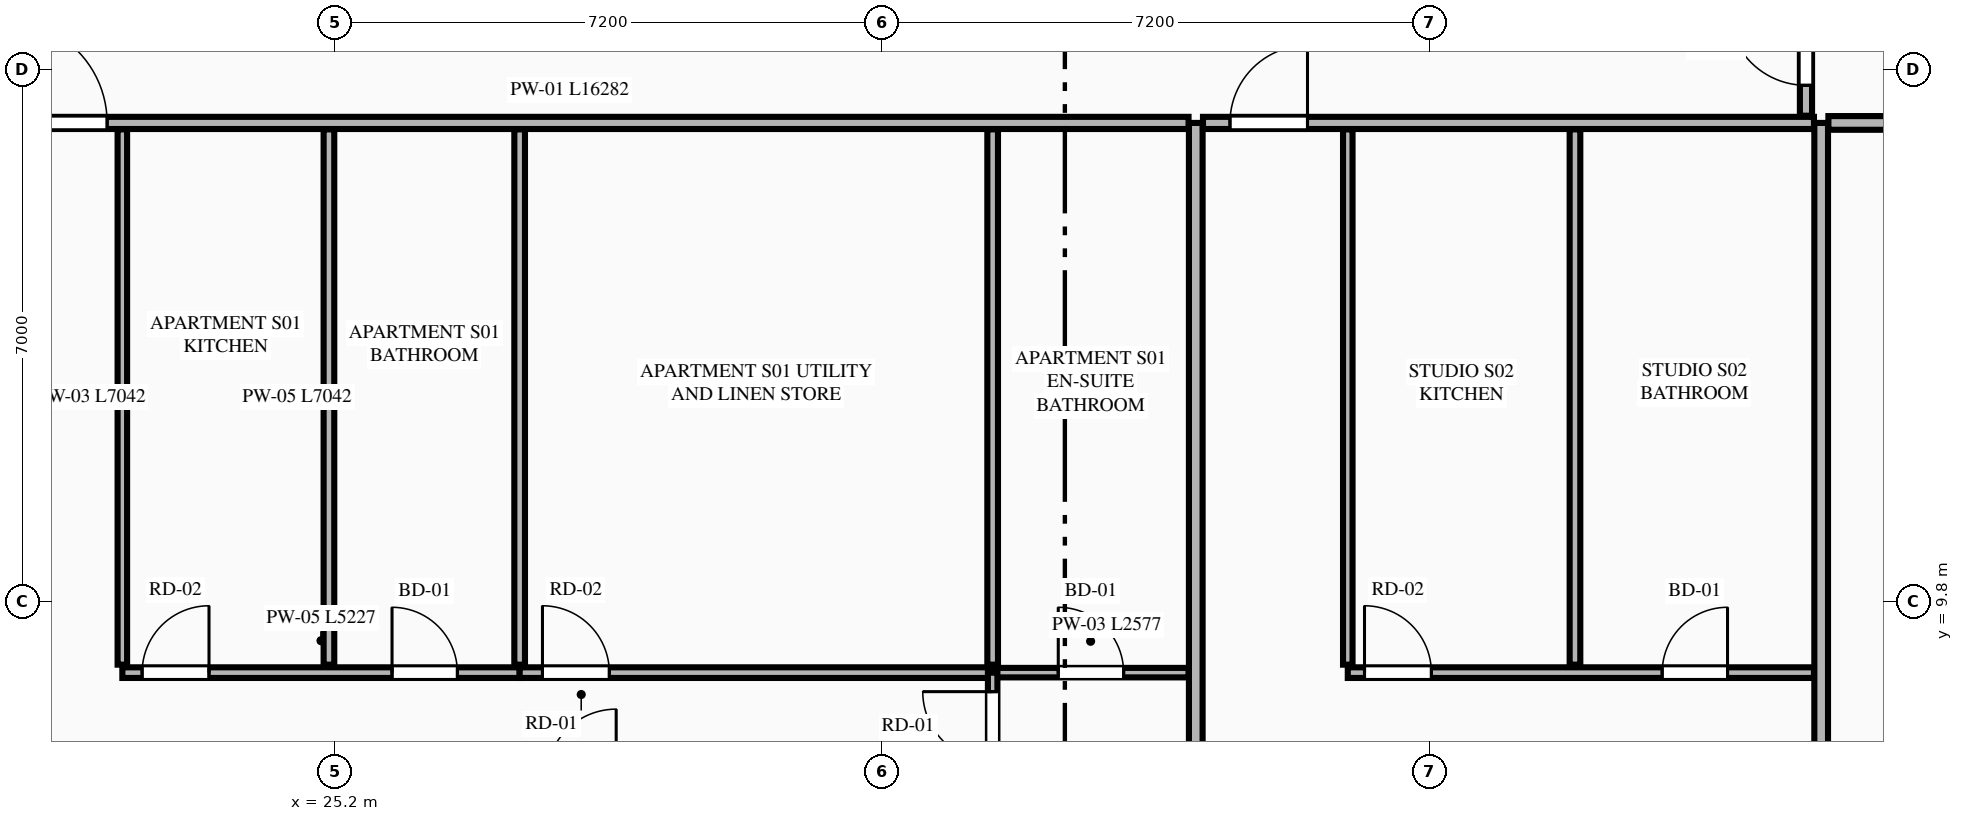
"""IFC4 building model, lengths in metres.
Left out: names, types, materials, properties, quantities, classifications, styles, units other than length and angle.
Written with IfcOpenShell. Run it as: python <this file> out.ifc"""

import sys

from ifc_helpers import new_model, si_unit, direction, frame, frame_2d, origin, place, context, subcontext, project, spatial, rectangle, extrude, element, fill, save


model = new_model("IFC4")
c1 = context("Model", 3, precision=1e-05, world=origin(), true_north=direction((0.0, 1.0)))
c2 = subcontext(c1, "Body", "Model", "MODEL_VIEW")
j1 = project(units=[si_unit("LENGTHUNIT", "METRE"), si_unit("PLANEANGLEUNIT", "RADIAN")], contexts=[c1])
p1 = place(None, origin())
s1 = spatial("IfcSite", under=j1, at=p1, CompositionType="ELEMENT")
p2 = place(p1, origin())
s2 = spatial("IfcBuilding", under=s1, at=p2, CompositionType="ELEMENT")
p3 = place(p2, frame((0.0, 0.0, 87.1)))
s3 = spatial("IfcBuildingStorey", under=s2, at=p3, CompositionType="ELEMENT", Elevation=87.1)
p4 = place(p3, frame((36.522, 2.455, 0.0), z_axis=(0.0, 0.0, 1.0), x_axis=(0.0, 1.0, 0.0)))
e1 = element("IfcWall", 1, at=p4, inside=s3, PredefinedType="PARTITIONING", context=c2, shape_type="SweptSolid", body=[
    extrude(rectangle(XDim=13.645, YDim=0.18, at=frame_2d((6.823, 0.0))), origin(), (0.0, 0.0, 1.0), 2.7),
])
p5 = place(p3, frame((44.75, 2.455, 0.0), z_axis=(0.0, 0.0, 1.0), x_axis=(0.0, 1.0, 0.0)))
e2 = element("IfcWall", 2, at=p5, inside=s3, PredefinedType="PARTITIONING", context=c2, shape_type="SweptSolid", body=[
    extrude(rectangle(XDim=13.645, YDim=0.18, at=frame_2d((6.823, 0.0))), origin(), (0.0, 0.0, 1.0), 3.33),
])
p6 = place(p3, frame((20.145, 16.1, 0.0), z_axis=(0.0, 0.0, 1.0), x_axis=(1.0, 0.0, 0.0)))
e3 = element("IfcWall", 3, at=p6, inside=s3, PredefinedType="PARTITIONING", context=c2, shape_type="SweptSolid", body=[
    extrude(rectangle(XDim=16.282, YDim=0.16, at=frame_2d((8.141, 0.0))), origin(), (0.0, 0.0, 1.0), 3.33),
])
p7 = place(p6, frame((0.705, 0.0, 0.0)))
e4 = element("IfcOpeningElement", 4, at=p7, cuts=e3, PredefinedType="OPENING", context=c2, shape_type="SweptSolid", body=[
    extrude(rectangle(XDim=1.35, YDim=2.35, at=frame_2d((0.675, 1.175))), frame((0.0, 0.09, 0.0), z_axis=(0.0, -1.0, 0.0), x_axis=(1.0, 0.0, 0.0)), (0.0, 0.0, 1.0), 0.18),
])
p8 = place(p3, frame((22.4, 8.973, 0.0), z_axis=(0.0, 0.0, 1.0), x_axis=(0.0, 1.0, 0.0)))
e5 = element("IfcWall", 5, at=p8, inside=s3, PredefinedType="PARTITIONING", context=c2, shape_type="SweptSolid", body=[
    extrude(rectangle(XDim=7.042, YDim=0.125, at=frame_2d((3.521, 0.0))), origin(), (0.0, 0.0, 1.0), 2.7),
])
p9 = place(p3, frame((22.4, 8.868, 0.0), z_axis=(0.0, 0.0, 1.0), x_axis=(1.0, 0.0, 0.0)))
e6 = element("IfcWall", 6, at=p9, inside=s3, PredefinedType="PLUMBINGWALL", context=c2, shape_type="SweptSolid", body=[
    extrude(rectangle(XDim=5.227, YDim=0.14, at=frame_2d((2.614, 0.0))), origin(), (0.0, 0.0, 1.0), 3.33),
])
p10 = place(p9, frame((3.548, 0.0, 0.0)))
e7 = element("IfcOpeningElement", 7, at=p10, cuts=e6, PredefinedType="OPENING", context=c2, shape_type="SweptSolid", body=[
    extrude(rectangle(XDim=0.86, YDim=2.1, at=frame_2d((0.43, 1.05))), frame((0.0, 0.08, 0.0), z_axis=(0.0, -1.0, 0.0), x_axis=(1.0, 0.0, 0.0)), (0.0, 0.0, 1.0), 0.16),
])
p11 = place(p9, frame((0.26, 0.0, 0.0)))
e8 = element("IfcOpeningElement", 8, at=p11, cuts=e6, PredefinedType="OPENING", context=c2, shape_type="SweptSolid", body=[
    extrude(rectangle(XDim=0.88, YDim=2.15, at=frame_2d((0.44, 1.075))), frame((0.0, 0.08, 0.0), z_axis=(0.0, -1.0, 0.0), x_axis=(1.0, 0.0, 0.0)), (0.0, 0.0, 1.0), 0.16),
])
p12 = place(p3, frame((27.627, 8.868, 0.0), z_axis=(0.0, 0.0, 1.0), x_axis=(1.0, 0.0, 0.0)))
e9 = element("IfcWall", 9, at=p12, inside=s3, PredefinedType="PLUMBINGWALL", context=c2, shape_type="SweptSolid", body=[
    extrude(rectangle(XDim=6.223, YDim=0.14, at=frame_2d((3.112, 0.0))), origin(), (0.0, 0.0, 1.0), 3.33),
])
p13 = place(p12, frame((0.3, 0.0, 0.0)))
e10 = element("IfcOpeningElement", 10, at=p13, cuts=e9, PredefinedType="OPENING", context=c2, shape_type="SweptSolid", body=[
    extrude(rectangle(XDim=0.88, YDim=2.15, at=frame_2d((0.44, 1.075))), frame((0.0, 0.08, 0.0), z_axis=(0.0, -1.0, 0.0), x_axis=(1.0, 0.0, 0.0)), (0.0, 0.0, 1.0), 0.16),
])
p14 = place(p3, frame((33.85, 8.868, 0.0), z_axis=(0.0, 0.0, 1.0), x_axis=(1.0, 0.0, 0.0)))
e11 = element("IfcWall", 11, at=p14, inside=s3, PredefinedType="PARTITIONING", context=c2, shape_type="SweptSolid", body=[
    extrude(rectangle(XDim=2.577, YDim=0.125, at=frame_2d((1.289, 0.0))), origin(), (0.0, 0.0, 1.0), 3.33),
])
p15 = place(p14, frame((0.863, 0.0, 0.0)))
e12 = element("IfcOpeningElement", 12, at=p15, cuts=e11, PredefinedType="OPENING", context=c2, shape_type="SweptSolid", body=[
    extrude(rectangle(XDim=0.86, YDim=2.1, at=frame_2d((0.43, 1.05))), frame((0.0, 0.073, 0.0), z_axis=(0.0, -1.0, 0.0), x_axis=(1.0, 0.0, 0.0)), (0.0, 0.0, 1.0), 0.145),
])
p16 = place(p3, frame((25.118, 8.973, 0.0), z_axis=(0.0, 0.0, 1.0), x_axis=(0.0, 1.0, 0.0)))
e13 = element("IfcWall", 13, at=p16, inside=s3, PredefinedType="PLUMBINGWALL", context=c2, shape_type="SweptSolid", body=[
    extrude(rectangle(XDim=7.042, YDim=0.14, at=frame_2d((3.521, 0.0))), origin(), (0.0, 0.0, 1.0), 3.33),
])
p17 = place(p3, frame((33.85, 7.538, 0.0), z_axis=(0.0, 0.0, 1.0), x_axis=(0.0, 1.0, 0.0)))
e14 = element("IfcWall", 14, at=p17, inside=s3, PredefinedType="PARTITIONING", context=c2, shape_type="SweptSolid", body=[
    extrude(rectangle(XDim=1.33, YDim=0.125, at=frame_2d((0.665, 0.0))), origin(), (0.0, 0.0, 1.0), 3.33),
])
p18 = place(p17, frame((0.16, 0.0, 0.0)))
e15 = element("IfcOpeningElement", 15, at=p18, cuts=e14, PredefinedType="OPENING", context=c2, shape_type="SweptSolid", body=[
    extrude(rectangle(XDim=0.92, YDim=2.15, at=frame_2d((0.46, 1.075))), frame((0.0, 0.073, 0.0), z_axis=(0.0, -1.0, 0.0), x_axis=(1.0, 0.0, 0.0)), (0.0, 0.0, 1.0), 0.145),
])
for number, where, z_axis, x_axis in (
    (16, (27.627, 8.973, 0.0), (0.0, 0.0, 1.0), (0.0, 1.0, 0.0)),
    (17, (33.85, 8.973, 0.0), (0.0, 0.0, 1.0), (0.0, 1.0, 0.0)),
):
    element("IfcWall", number, at=place(p3, frame(where, z_axis=z_axis, x_axis=x_axis)), inside=s3, PredefinedType="PLUMBINGWALL", context=c2, shape_type="SweptSolid", body=[
        extrude(rectangle(XDim=7.042, YDim=0.14, at=frame_2d((3.521, 0.0))), origin(), (0.0, 0.0, 1.0), 3.33),
    ])
p19 = place(p3, frame((36.617, 16.1, 0.0), z_axis=(0.0, 0.0, 1.0), x_axis=(1.0, 0.0, 0.0)))
e18 = element("IfcWall", 18, at=p19, inside=s3, PredefinedType="PARTITIONING", context=c2, shape_type="SweptSolid", body=[
    extrude(rectangle(XDim=8.038, YDim=0.16, at=frame_2d((4.019, 0.0))), origin(), (0.0, 0.0, 1.0), 3.33),
])
p20 = place(p19, frame((0.355, 0.0, 0.0)))
e19 = element("IfcOpeningElement", 19, at=p20, cuts=e18, PredefinedType="OPENING", context=c2, shape_type="SweptSolid", body=[
    extrude(rectangle(XDim=1.02, YDim=2.25, at=frame_2d((0.51, 1.125))), frame((0.0, 0.09, 0.0), z_axis=(0.0, -1.0, 0.0), x_axis=(1.0, 0.0, 0.0)), (0.0, 0.0, 1.0), 0.18),
])
p21 = place(p3, frame((38.522, 8.973, 0.0), z_axis=(0.0, 0.0, 1.0), x_axis=(0.0, 1.0, 0.0)))
e20 = element("IfcWall", 20, at=p21, inside=s3, PredefinedType="PARTITIONING", context=c2, shape_type="SweptSolid", body=[
    extrude(rectangle(XDim=7.042, YDim=0.125, at=frame_2d((3.521, 0.0))), origin(), (0.0, 0.0, 1.0), 3.33),
])
p22 = place(p3, frame((38.522, 8.868, 0.0), z_axis=(0.0, 0.0, 1.0), x_axis=(1.0, 0.0, 0.0)))
e21 = element("IfcWall", 21, at=p22, inside=s3, PredefinedType="PLUMBINGWALL", context=c2, shape_type="SweptSolid", body=[
    extrude(rectangle(XDim=6.133, YDim=0.14, at=frame_2d((3.066, 0.0))), origin(), (0.0, 0.0, 1.0), 3.33),
])
p23 = place(p22, frame((4.136, 0.0, 0.0)))
e22 = element("IfcOpeningElement", 22, at=p23, cuts=e21, PredefinedType="OPENING", context=c2, shape_type="SweptSolid", body=[
    extrude(rectangle(XDim=0.86, YDim=2.1, at=frame_2d((0.43, 1.05))), frame((0.0, 0.08, 0.0), z_axis=(0.0, -1.0, 0.0), x_axis=(1.0, 0.0, 0.0)), (0.0, 0.0, 1.0), 0.16),
])
p24 = place(p22, frame((0.22, 0.0, 0.0)))
e23 = element("IfcOpeningElement", 23, at=p24, cuts=e21, PredefinedType="OPENING", context=c2, shape_type="SweptSolid", body=[
    extrude(rectangle(XDim=0.88, YDim=2.15, at=frame_2d((0.44, 1.075))), frame((0.0, 0.08, 0.0), z_axis=(0.0, -1.0, 0.0), x_axis=(1.0, 0.0, 0.0)), (0.0, 0.0, 1.0), 0.16),
])
p25 = place(p3, frame((41.511, 8.973, 0.0), z_axis=(0.0, 0.0, 1.0), x_axis=(0.0, 1.0, 0.0)))
e24 = element("IfcWall", 24, at=p25, inside=s3, PredefinedType="PLUMBINGWALL", context=c2, shape_type="SweptSolid", body=[
    extrude(rectangle(XDim=7.042, YDim=0.14, at=frame_2d((3.521, 0.0))), origin(), (0.0, 0.0, 1.0), 3.33),
])
p26 = place(p3, frame((44.845, 16.1, 0.0), z_axis=(0.0, 0.0, 1.0), x_axis=(1.0, 0.0, 0.0)))
e25 = element("IfcWall", 25, at=p26, inside=s3, PredefinedType="PARTITIONING", context=c2, shape_type="SweptSolid", body=[
    extrude(rectangle(XDim=9.467, YDim=0.18, at=frame_2d((4.733, 0.0))), origin(), (0.0, 0.0, 1.0), 3.33),
])
p27 = place(p3, frame((44.55, 16.195, 0.0), z_axis=(0.0, 0.0, 1.0), x_axis=(0.0, 1.0, 0.0)))
e26 = element("IfcWall", 26, at=p27, inside=s3, PredefinedType="PARTITIONING", context=c2, shape_type="SweptSolid", body=[
    extrude(rectangle(XDim=19.41, YDim=0.16, at=frame_2d((9.705, 0.0))), origin(), (0.0, 0.0, 1.0), 2.7),
])
p28 = place(p27, frame((0.4, 0.0, 0.0)))
e27 = element("IfcOpeningElement", 27, at=p28, cuts=e26, PredefinedType="OPENING", context=c2, shape_type="SweptSolid", body=[
    extrude(rectangle(XDim=1.02, YDim=2.25, at=frame_2d((0.51, 1.125))), frame((0.0, 0.09, 0.0), z_axis=(0.0, -1.0, 0.0), x_axis=(1.0, 0.0, 0.0)), (0.0, 0.0, 1.0), 0.18),
])
p29 = place(p10, origin())
e28 = element("IfcDoor", 28, at=p29, inside=s3, OperationType="SINGLE_SWING_LEFT", PredefinedType="DOOR", context=c2, shape_type="SweptSolid", body=[
    extrude(rectangle(XDim=0.86, YDim=2.1, at=frame_2d((0.43, 1.05))), frame((0.0, 0.025, 0.0), z_axis=(0.0, -1.0, 0.0), x_axis=(1.0, 0.0, 0.0)), (0.0, 0.0, 1.0), 0.05),
])
fill(e7, e28)
p30 = place(p15, origin())
e29 = element("IfcDoor", 29, at=p30, inside=s3, OperationType="SINGLE_SWING_LEFT", PredefinedType="DOOR", context=c2, shape_type="SweptSolid", body=[
    extrude(rectangle(XDim=0.86, YDim=2.1, at=frame_2d((0.43, 1.05))), frame((0.0, 0.025, 0.0), z_axis=(0.0, -1.0, 0.0), x_axis=(1.0, 0.0, 0.0)), (0.0, 0.0, 1.0), 0.05),
])
fill(e12, e29)
p31 = place(p7, origin())
e30 = element("IfcDoor", 30, at=p31, inside=s3, OperationType="SINGLE_SWING_LEFT", PredefinedType="DOOR", context=c2, shape_type="SweptSolid", body=[
    extrude(rectangle(XDim=1.35, YDim=2.35, at=frame_2d((0.675, 1.175))), frame((0.0, 0.025, 0.0), z_axis=(0.0, -1.0, 0.0), x_axis=(1.0, 0.0, 0.0)), (0.0, 0.0, 1.0), 0.05),
])
fill(e4, e30)
p32 = place(p11, origin())
e31 = element("IfcDoor", 31, at=p32, inside=s3, OperationType="SINGLE_SWING_RIGHT", PredefinedType="DOOR", context=c2, shape_type="SweptSolid", body=[
    extrude(rectangle(XDim=0.88, YDim=2.15, at=frame_2d((0.44, 1.075))), frame((0.0, 0.025, 0.0), z_axis=(0.0, -1.0, 0.0), x_axis=(1.0, 0.0, 0.0)), (0.0, 0.0, 1.0), 0.05),
])
fill(e8, e31)
p33 = place(p13, origin())
e32 = element("IfcDoor", 32, at=p33, inside=s3, OperationType="SINGLE_SWING_LEFT", PredefinedType="DOOR", context=c2, shape_type="SweptSolid", body=[
    extrude(rectangle(XDim=0.88, YDim=2.15, at=frame_2d((0.44, 1.075))), frame((0.0, 0.025, 0.0), z_axis=(0.0, -1.0, 0.0), x_axis=(1.0, 0.0, 0.0)), (0.0, 0.0, 1.0), 0.05),
])
fill(e10, e32)
p34 = place(p18, origin())
e33 = element("IfcDoor", 33, at=p34, inside=s3, OperationType="SINGLE_SWING_RIGHT", PredefinedType="DOOR", context=c2, shape_type="SweptSolid", body=[
    extrude(rectangle(XDim=0.92, YDim=2.15, at=frame_2d((0.46, 1.075))), frame((0.0, 0.025, 0.0), z_axis=(0.0, -1.0, 0.0), x_axis=(1.0, 0.0, 0.0)), (0.0, 0.0, 1.0), 0.05),
])
fill(e15, e33)
p35 = place(p23, origin())
e34 = element("IfcDoor", 34, at=p35, inside=s3, OperationType="SINGLE_SWING_RIGHT", PredefinedType="DOOR", context=c2, shape_type="SweptSolid", body=[
    extrude(rectangle(XDim=0.86, YDim=2.1, at=frame_2d((0.43, 1.05))), frame((0.0, 0.025, 0.0), z_axis=(0.0, -1.0, 0.0), x_axis=(1.0, 0.0, 0.0)), (0.0, 0.0, 1.0), 0.05),
])
fill(e22, e34)
p36 = place(p20, origin())
e35 = element("IfcDoor", 35, at=p36, inside=s3, OperationType="SINGLE_SWING_RIGHT", PredefinedType="DOOR", context=c2, shape_type="SweptSolid", body=[
    extrude(rectangle(XDim=1.02, YDim=2.25, at=frame_2d((0.51, 1.125))), frame((0.0, 0.025, 0.0), z_axis=(0.0, -1.0, 0.0), x_axis=(1.0, 0.0, 0.0)), (0.0, 0.0, 1.0), 0.05),
])
fill(e19, e35)
p37 = place(p24, origin())
e36 = element("IfcDoor", 36, at=p37, inside=s3, OperationType="SINGLE_SWING_LEFT", PredefinedType="DOOR", context=c2, shape_type="SweptSolid", body=[
    extrude(rectangle(XDim=0.88, YDim=2.15, at=frame_2d((0.44, 1.075))), frame((0.0, 0.025, 0.0), z_axis=(0.0, -1.0, 0.0), x_axis=(1.0, 0.0, 0.0)), (0.0, 0.0, 1.0), 0.05),
])
fill(e23, e36)
p38 = place(p28, origin())
e37 = element("IfcDoor", 37, at=p38, inside=s3, OperationType="SINGLE_SWING_RIGHT", PredefinedType="DOOR", context=c2, shape_type="SweptSolid", body=[
    extrude(rectangle(XDim=1.02, YDim=2.25, at=frame_2d((0.51, 1.125))), frame((0.0, 0.025, 0.0), z_axis=(0.0, -1.0, 0.0), x_axis=(1.0, 0.0, 0.0)), (0.0, 0.0, 1.0), 0.05),
])
fill(e27, e37)
save(model, sys.argv[1])
